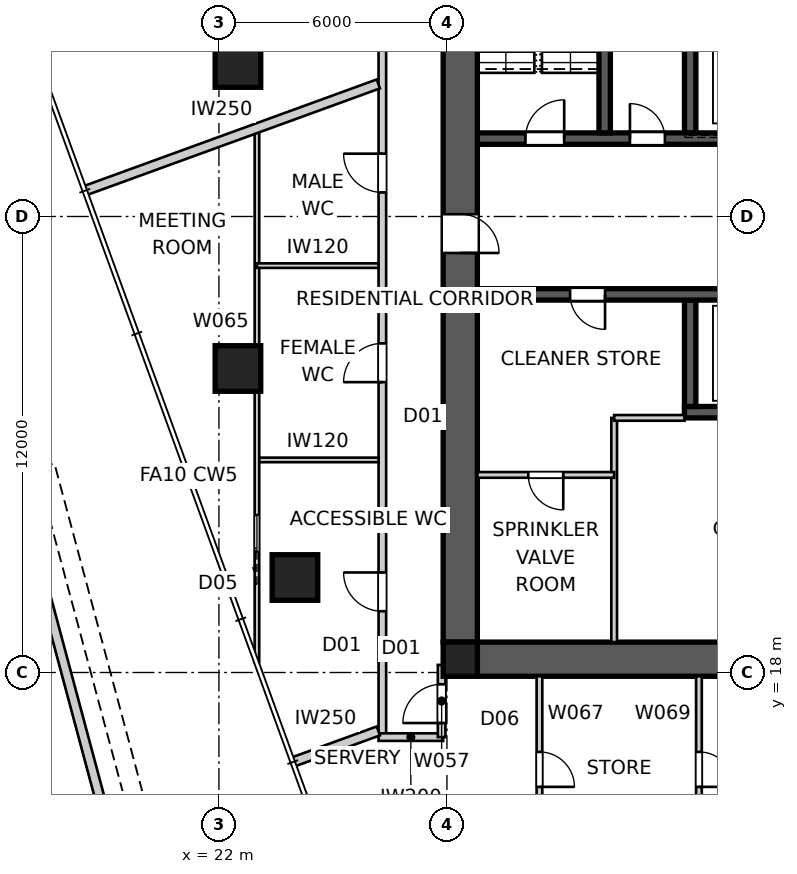
"""IFC4 building model, lengths in metres.
Left out: names, types, materials, properties, quantities, classifications, styles, units other than length and angle.
Written with IfcOpenShell. Run it as: python <this file> out.ifc"""

import sys

from ifc_helpers import new_model, si_unit, direction, frame, frame_2d, origin, origin_2d, place, context, subcontext, project, spatial, polyline, rectangle, outline, extrude, element, fill, save


model = new_model("IFC4")
c1 = context("Model", 3, precision=1e-05, world=origin(), true_north=direction((0.0, 1.0)))
c2 = subcontext(c1, "Body", "Model", "MODEL_VIEW")
j1 = project(units=[si_unit("LENGTHUNIT", "METRE"), si_unit("PLANEANGLEUNIT", "RADIAN")], contexts=[c1])
p1 = place(None, origin())
s1 = spatial("IfcSite", under=j1, at=p1, CompositionType="ELEMENT")
p2 = place(p1, origin())
s2 = spatial("IfcBuilding", under=s1, at=p2, CompositionType="ELEMENT")
p3 = place(p2, frame((0.0, 0.0, 138.8)))
s3 = spatial("IfcBuildingStorey", under=s2, at=p3, CompositionType="ELEMENT", Elevation=138.8)
p4 = place(p3, frame((51.2, 18.35, 0.0), z_axis=(0.0, 0.0, 1.0), x_axis=(-1.0, 0.0, 0.0)))
e1 = element("IfcWall", 1, at=p4, inside=s3, PredefinedType="SHEAR", context=c2, shape_type="SweptSolid", body=[
    extrude(outline(polyline([(0.0, -0.45), (22.4, -0.45), (22.4, -0.025), (22.85, -0.025), (22.85, 0.025), (22.4, 0.025), (22.4, 0.45), (0.0, 0.45), (0.0, 0.025), (-0.45, 0.025), (-0.45, -0.025), (0.0, -0.025), (0.0, -0.45)])), origin(), (0.0, 0.0, 1.0), 5.0),
])
p5 = place(p3, frame((28.35, 41.2, 0.0), z_axis=(0.0, 0.0, 1.0), x_axis=(0.0, -1.0, 0.0)))
e2 = element("IfcWall", 2, at=p5, inside=s3, PredefinedType="SHEAR", context=c2, shape_type="SweptSolid", body=[
    extrude(outline(polyline([(0.0, -0.45), (22.4, -0.45), (22.4, -0.025), (22.85, -0.025), (22.85, 0.025), (22.4, 0.025), (22.4, 0.45), (0.0, 0.45), (0.0, 0.025), (-0.45, 0.025), (-0.45, -0.025), (0.0, -0.025), (0.0, -0.45)])), origin(), (0.0, 0.0, 1.0), 5.0),
])
p6 = place(p5, frame((11.14, 0.0, 0.0)))
e3 = element("IfcOpeningElement", 3, at=p6, cuts=e2, PredefinedType="OPENING", context=c2, shape_type="SweptSolid", body=[
    extrude(rectangle(XDim=1.02, YDim=2.4, at=frame_2d((0.51, 1.2))), frame((0.0, 0.46, 0.0), z_axis=(0.0, -1.0, 0.0), x_axis=(1.0, 0.0, 0.0)), (0.0, 0.0, 1.0), 0.92),
])
p7 = place(p3, frame((28.8, 32.05, 0.0), z_axis=(0.0, 0.0, 1.0), x_axis=(1.0, 0.0, 0.0)))
e4 = element("IfcWall", 4, at=p7, inside=s3, PredefinedType="SHEAR", context=c2, shape_type="SweptSolid", body=[
    extrude(rectangle(XDim=22.4, YDim=0.3, at=frame_2d((11.2, 0.0))), origin(), (0.0, 0.0, 1.0), 5.0),
])
p8 = place(p7, frame((19.04, 0.0, 0.0)))
e5 = element("IfcOpeningElement", 5, at=p8, cuts=e4, PredefinedType="OPENING", context=c2, shape_type="SweptSolid", body=[
    extrude(rectangle(XDim=0.92, YDim=2.1, at=frame_2d((0.46, 1.05))), frame((0.0, 0.16, 0.0), z_axis=(0.0, -1.0, 0.0), x_axis=(1.0, 0.0, 0.0)), (0.0, 0.0, 1.0), 0.32),
])
p9 = place(p7, frame((1.265, 0.0, 0.0)))
e6 = element("IfcOpeningElement", 6, at=p9, cuts=e4, PredefinedType="OPENING", context=c2, shape_type="SweptSolid", body=[
    extrude(rectangle(XDim=1.02, YDim=2.1, at=frame_2d((0.51, 1.05))), frame((0.0, 0.16, 0.0), z_axis=(0.0, -1.0, 0.0), x_axis=(1.0, 0.0, 0.0)), (0.0, 0.0, 1.0), 0.32),
])
p10 = place(p7, frame((4.015, 0.0, 0.0)))
e7 = element("IfcOpeningElement", 7, at=p10, cuts=e4, PredefinedType="OPENING", context=c2, shape_type="SweptSolid", body=[
    extrude(rectangle(XDim=0.92, YDim=2.1, at=frame_2d((0.46, 1.05))), frame((0.0, 0.16, 0.0), z_axis=(0.0, -1.0, 0.0), x_axis=(1.0, 0.0, 0.0)), (0.0, 0.0, 1.0), 0.32),
])
p11 = place(p7, frame((6.45, 0.0, 0.0)))
e8 = element("IfcOpeningElement", 8, at=p11, cuts=e4, PredefinedType="OPENING", context=c2, shape_type="SweptSolid", body=[
    extrude(rectangle(XDim=1.1, YDim=2.1, at=frame_2d((0.55, 1.05))), frame((0.0, 0.16, 0.0), z_axis=(0.0, -1.0, 0.0), x_axis=(1.0, 0.0, 0.0)), (0.0, 0.0, 1.0), 0.32),
])
p12 = place(p7, frame((9.25, 0.0, 0.0)))
e9 = element("IfcOpeningElement", 9, at=p12, cuts=e4, PredefinedType="OPENING", context=c2, shape_type="SweptSolid", body=[
    extrude(rectangle(XDim=1.1, YDim=2.1, at=frame_2d((0.55, 1.05))), frame((0.0, 0.16, 0.0), z_axis=(0.0, -1.0, 0.0), x_axis=(1.0, 0.0, 0.0)), (0.0, 0.0, 1.0), 0.32),
])
p13 = place(p7, frame((12.05, 0.0, 0.0)))
e10 = element("IfcOpeningElement", 10, at=p13, cuts=e4, PredefinedType="OPENING", context=c2, shape_type="SweptSolid", body=[
    extrude(rectangle(XDim=1.1, YDim=2.1, at=frame_2d((0.55, 1.05))), frame((0.0, 0.16, 0.0), z_axis=(0.0, -1.0, 0.0), x_axis=(1.0, 0.0, 0.0)), (0.0, 0.0, 1.0), 0.32),
])
p14 = place(p7, frame((14.85, 0.0, 0.0)))
e11 = element("IfcOpeningElement", 11, at=p14, cuts=e4, PredefinedType="OPENING", context=c2, shape_type="SweptSolid", body=[
    extrude(rectangle(XDim=1.1, YDim=2.1, at=frame_2d((0.55, 1.05))), frame((0.0, 0.16, 0.0), z_axis=(0.0, -1.0, 0.0), x_axis=(1.0, 0.0, 0.0)), (0.0, 0.0, 1.0), 0.32),
])
p15 = place(p3, frame((51.2, 27.95, 0.0), z_axis=(0.0, 0.0, 1.0), x_axis=(-1.0, 0.0, 0.0)))
e12 = element("IfcWall", 12, at=p15, inside=s3, PredefinedType="SHEAR", context=c2, shape_type="SweptSolid", body=[
    extrude(rectangle(XDim=22.4, YDim=0.3, at=frame_2d((11.2, 0.0))), origin(), (0.0, 0.0, 1.0), 5.0),
])
p16 = place(p15, frame((19.04, 0.0, 0.0)))
e13 = element("IfcOpeningElement", 13, at=p16, cuts=e12, PredefinedType="OPENING", context=c2, shape_type="SweptSolid", body=[
    extrude(rectangle(XDim=0.92, YDim=2.1, at=frame_2d((0.46, 1.05))), frame((0.0, 0.16, 0.0), z_axis=(0.0, -1.0, 0.0), x_axis=(1.0, 0.0, 0.0)), (0.0, 0.0, 1.0), 0.32),
])
p17 = place(p15, frame((1.265, 0.0, 0.0)))
e14 = element("IfcOpeningElement", 14, at=p17, cuts=e12, PredefinedType="OPENING", context=c2, shape_type="SweptSolid", body=[
    extrude(rectangle(XDim=1.02, YDim=2.1, at=frame_2d((0.51, 1.05))), frame((0.0, 0.16, 0.0), z_axis=(0.0, -1.0, 0.0), x_axis=(1.0, 0.0, 0.0)), (0.0, 0.0, 1.0), 0.32),
])
p18 = place(p15, frame((4.015, 0.0, 0.0)))
e15 = element("IfcOpeningElement", 15, at=p18, cuts=e12, PredefinedType="OPENING", context=c2, shape_type="SweptSolid", body=[
    extrude(rectangle(XDim=0.92, YDim=2.1, at=frame_2d((0.46, 1.05))), frame((0.0, 0.16, 0.0), z_axis=(0.0, -1.0, 0.0), x_axis=(1.0, 0.0, 0.0)), (0.0, 0.0, 1.0), 0.32),
])
p19 = place(p15, frame((6.45, 0.0, 0.0)))
e16 = element("IfcOpeningElement", 16, at=p19, cuts=e12, PredefinedType="OPENING", context=c2, shape_type="SweptSolid", body=[
    extrude(rectangle(XDim=1.1, YDim=2.1, at=frame_2d((0.55, 1.05))), frame((0.0, 0.16, 0.0), z_axis=(0.0, -1.0, 0.0), x_axis=(1.0, 0.0, 0.0)), (0.0, 0.0, 1.0), 0.32),
])
p20 = place(p15, frame((9.25, 0.0, 0.0)))
e17 = element("IfcOpeningElement", 17, at=p20, cuts=e12, PredefinedType="OPENING", context=c2, shape_type="SweptSolid", body=[
    extrude(rectangle(XDim=1.1, YDim=2.1, at=frame_2d((0.55, 1.05))), frame((0.0, 0.16, 0.0), z_axis=(0.0, -1.0, 0.0), x_axis=(1.0, 0.0, 0.0)), (0.0, 0.0, 1.0), 0.32),
])
p21 = place(p15, frame((12.05, 0.0, 0.0)))
e18 = element("IfcOpeningElement", 18, at=p21, cuts=e12, PredefinedType="OPENING", context=c2, shape_type="SweptSolid", body=[
    extrude(rectangle(XDim=1.1, YDim=2.1, at=frame_2d((0.55, 1.05))), frame((0.0, 0.16, 0.0), z_axis=(0.0, -1.0, 0.0), x_axis=(1.0, 0.0, 0.0)), (0.0, 0.0, 1.0), 0.32),
])
p22 = place(p15, frame((14.85, 0.0, 0.0)))
e19 = element("IfcOpeningElement", 19, at=p22, cuts=e12, PredefinedType="OPENING", context=c2, shape_type="SweptSolid", body=[
    extrude(rectangle(XDim=1.1, YDim=2.1, at=frame_2d((0.55, 1.05))), frame((0.0, 0.16, 0.0), z_axis=(0.0, -1.0, 0.0), x_axis=(1.0, 0.0, 0.0)), (0.0, 0.0, 1.0), 0.32),
])
p23 = place(p3, frame((45.75, 24.85, 0.0), z_axis=(0.0, 0.0, 1.0), x_axis=(-1.0, 0.0, 0.0)))
e20 = element("IfcWall", 20, at=p23, inside=s3, PredefinedType="SHEAR", context=c2, shape_type="SweptSolid", body=[
    extrude(rectangle(XDim=11.5, YDim=0.3, at=frame_2d((5.75, 0.0))), origin(), (0.0, 0.0, 1.0), 5.0),
])
for number, where, z_axis, x_axis in (
    (21, (34.4, 32.2, 0.0), (0.0, 0.0, 1.0), (0.0, 1.0, 0.0)),
    (22, (34.4, 27.8, 0.0), (0.0, 0.0, 1.0), (0.0, -1.0, 0.0)),
):
    element("IfcWall", number, at=place(p3, frame(where, z_axis=z_axis, x_axis=x_axis)), inside=s3, PredefinedType="SHEAR", context=c2, shape_type="SweptSolid", body=[
        extrude(rectangle(XDim=2.8, YDim=0.3, at=frame_2d((1.4, 0.0))), origin(), (0.0, 0.0, 1.0), 5.0),
    ])
p24 = place(p3, frame((32.15, 32.2, 0.0), z_axis=(0.0, 0.0, 1.0), x_axis=(0.0, 1.0, 0.0)))
e23 = element("IfcWall", 23, at=p24, inside=s3, PredefinedType="SHEAR", context=c2, shape_type="SweptSolid", body=[
    extrude(rectangle(XDim=7.7, YDim=0.3, at=frame_2d((3.85, 0.0))), origin(), (0.0, 0.0, 1.0), 5.0),
])
p25 = place(p3, frame((28.35, 18.35, 0.0), z_axis=(0.0, 0.0, 1.0), x_axis=(1.0, 0.0, 0.0)))
e24 = element("IfcColumn", 24, at=p25, inside=s3, PredefinedType="COLUMN", context=c2, shape_type="SweptSolid", body=[
    extrude(rectangle(XDim=0.9, YDim=0.9, at=origin_2d()), origin(), (0.0, 0.0, 1.0), 5.0),
])
for number, where, z_axis, x_axis in (
    (25, (22.5, 34.0, 0.0), (0.0, 0.0, 1.0), (1.0, 0.0, 0.0)),
    (26, (22.5, 26.0, 0.0), (0.0, 0.0, 1.0), (1.0, 0.0, 0.0)),
    (27, (24.0, 20.5, 0.0), (0.0, 0.0, 1.0), (1.0, 0.0, 0.0)),
):
    element("IfcColumn", number, at=place(p3, frame(where, z_axis=z_axis, x_axis=x_axis)), inside=s3, PredefinedType="COLUMN", context=c2, shape_type="SweptSolid", body=[
        extrude(rectangle(XDim=1.2, YDim=1.2, at=origin_2d()), origin(), (0.0, 0.0, 1.0), 5.0),
    ])
p26 = place(p3, frame((15.248, 28.199, -0.05), z_axis=(0.0, 0.0, 1.0), x_axis=(0.258820599944, -0.965925409669, 0.0)))
e28 = element("IfcWall", 28, at=p26, inside=s3, PredefinedType="PARAPET", context=c2, shape_type="SweptSolid", body=[
    extrude(rectangle(XDim=29.167, YDim=0.25, at=frame_2d((14.583, 0.0))), origin(), (0.0, 0.0, 1.0), 1.15),
])
p27 = place(p3, frame((26.3, 16.3, 0.0), z_axis=(0.0, 0.0, 1.0), x_axis=(0.0, 1.0, 0.0)))
e29 = element("IfcWall", 29, at=p27, inside=s3, PredefinedType="PARTITIONING", context=c2, shape_type="SweptSolid", body=[
    extrude(rectangle(XDim=27.4, YDim=0.2, at=frame_2d((13.7, 0.0))), origin(), (0.0, 0.0, 1.0), 4.85),
])
p28 = place(p27, frame((21.639, 0.0, 0.0)))
e30 = element("IfcOpeningElement", 30, at=p28, cuts=e29, PredefinedType="OPENING", context=c2, shape_type="SweptSolid", body=[
    extrude(rectangle(XDim=1.02, YDim=2.34, at=frame_2d((0.51, 1.17))), frame((0.0, 0.11, 0.0), z_axis=(0.0, -1.0, 0.0), x_axis=(1.0, 0.0, 0.0)), (0.0, 0.0, 1.0), 0.22),
])
p29 = place(p27, frame((3.312, 0.0, 0.0)))
e31 = element("IfcOpeningElement", 31, at=p29, cuts=e29, PredefinedType="OPENING", context=c2, shape_type="SweptSolid", body=[
    extrude(rectangle(XDim=1.02, YDim=2.34, at=frame_2d((0.51, 1.17))), frame((0.0, 0.11, 0.0), z_axis=(0.0, -1.0, 0.0), x_axis=(1.0, 0.0, 0.0)), (0.0, 0.0, 1.0), 0.22),
])
p30 = place(p27, frame((9.341, 0.0, 0.0)))
e32 = element("IfcOpeningElement", 32, at=p30, cuts=e29, PredefinedType="OPENING", context=c2, shape_type="SweptSolid", body=[
    extrude(rectangle(XDim=1.02, YDim=2.34, at=frame_2d((0.51, 1.17))), frame((0.0, 0.11, 0.0), z_axis=(0.0, -1.0, 0.0), x_axis=(1.0, 0.0, 0.0)), (0.0, 0.0, 1.0), 0.22),
])
p31 = place(p27, frame((14.333, 0.0, 0.0)))
e33 = element("IfcOpeningElement", 33, at=p31, cuts=e29, PredefinedType="OPENING", context=c2, shape_type="SweptSolid", body=[
    extrude(rectangle(XDim=1.02, YDim=2.34, at=frame_2d((0.51, 1.17))), frame((0.0, 0.11, 0.0), z_axis=(0.0, -1.0, 0.0), x_axis=(1.0, 0.0, 0.0)), (0.0, 0.0, 1.0), 0.22),
])
p32 = place(p3, frame((27.9, 16.3, 0.0), z_axis=(0.0, 0.0, 1.0), x_axis=(-1.0, 0.0, 0.0)))
e34 = element("IfcWall", 34, at=p32, inside=s3, PredefinedType="PARTITIONING", context=c2, shape_type="SweptSolid", body=[
    extrude(rectangle(XDim=1.7, YDim=0.2, at=frame_2d((0.85, 0.0))), origin(), (0.0, 0.0, 1.0), 4.85),
])
p33 = place(p3, frame((27.86, 16.3, 0.0), z_axis=(0.0, 0.0, 1.0), x_axis=(0.0, 1.0, 0.0)))
e35 = element("IfcWall", 35, at=p33, inside=s3, PredefinedType="PARTITIONING", context=c2, shape_type="SweptSolid", body=[
    extrude(rectangle(XDim=1.9, YDim=0.2, at=frame_2d((0.95, 0.0))), origin(), (0.0, 0.0, 1.0), 4.85),
])
p34 = place(p33, frame((0.37, 0.0, 0.0)))
e36 = element("IfcOpeningElement", 36, at=p34, cuts=e35, PredefinedType="OPENING", context=c2, shape_type="SweptSolid", body=[
    extrude(rectangle(XDim=1.02, YDim=2.34, at=frame_2d((0.51, 1.17))), frame((0.0, 0.11, 0.0), z_axis=(0.0, -1.0, 0.0), x_axis=(1.0, 0.0, 0.0)), (0.0, 0.0, 1.0), 0.22),
])
p35 = place(p3, frame((18.47, 30.677, 0.0), z_axis=(0.0, 0.0, 1.0), x_axis=(0.939696268654, 0.342010120724, 0.0)))
e37 = element("IfcWall", 37, at=p35, inside=s3, PredefinedType="PARTITIONING", context=c2, shape_type="SweptSolid", body=[
    extrude(rectangle(XDim=8.221, YDim=0.25, at=frame_2d((4.11, 0.0))), origin(), (0.0, 0.0, 1.0), 4.85),
])
p36 = place(p3, frame((23.942, 15.642, 0.0), z_axis=(0.0, 0.0, 1.0), x_axis=(0.939692273186, 0.342021098348, 0.0)))
e38 = element("IfcWall", 38, at=p36, inside=s3, PredefinedType="PARTITIONING", context=c2, shape_type="SweptSolid", body=[
    extrude(rectangle(XDim=2.397, YDim=0.25, at=frame_2d((1.198, 0.0))), origin(), (0.0, 0.0, 1.0), 4.85),
])
p37 = place(p3, frame((32.4, 18.8, 0.0), z_axis=(0.0, 0.0, 1.0), x_axis=(0.0, 1.0, 0.0)))
e39 = element("IfcWall", 39, at=p37, inside=s3, PredefinedType="SOLIDWALL", context=c2, shape_type="SweptSolid", body=[
    extrude(rectangle(XDim=5.9, YDim=0.15, at=frame_2d((2.95, 0.0))), origin(), (0.0, 0.0, 1.0), 4.85),
])
p38 = place(p3, frame((32.4, 24.7, 0.0), z_axis=(0.0, 0.0, 1.0), x_axis=(1.0, 0.0, 0.0)))
e40 = element("IfcWall", 40, at=p38, inside=s3, PredefinedType="SOLIDWALL", context=c2, shape_type="SweptSolid", body=[
    extrude(rectangle(XDim=1.85, YDim=0.15, at=frame_2d((0.925, 0.0))), origin(), (0.0, 0.0, 1.0), 4.85),
])
p39 = place(p3, frame((32.4, 23.2, 0.0), z_axis=(0.0, 0.0, 1.0), x_axis=(-1.0, 0.0, 0.0)))
e41 = element("IfcWall", 41, at=p39, inside=s3, PredefinedType="SOLIDWALL", context=c2, shape_type="SweptSolid", body=[
    extrude(rectangle(XDim=3.6, YDim=0.15, at=frame_2d((1.8, 0.0))), origin(), (0.0, 0.0, 1.0), 4.85),
])
p40 = place(p39, frame((1.34, 0.0, 0.0)))
e42 = element("IfcOpeningElement", 42, at=p40, cuts=e41, PredefinedType="OPENING", context=c2, shape_type="SweptSolid", body=[
    extrude(rectangle(XDim=0.92, YDim=2.1, at=frame_2d((0.46, 1.05))), frame((0.0, 0.085, 0.0), z_axis=(0.0, -1.0, 0.0), x_axis=(1.0, 0.0, 0.0)), (0.0, 0.0, 1.0), 0.17),
])
p41 = place(p3, frame((23.0, 23.594, 0.0), z_axis=(0.0, 0.0, 1.0), x_axis=(1.0, 0.0, 0.0)))
e43 = element("IfcWall", 43, at=p41, inside=s3, PredefinedType="PARTITIONING", context=c2, shape_type="SweptSolid", body=[
    extrude(rectangle(XDim=3.2, YDim=0.12, at=frame_2d((1.6, 0.0))), origin(), (0.0, 0.0, 1.0), 4.85),
])
p42 = place(p3, frame((23.0, 18.271, 0.0), z_axis=(0.0, 0.0, 1.0), x_axis=(0.0, 1.0, 0.0)))
e44 = element("IfcWall", 44, at=p42, inside=s3, PredefinedType="PARTITIONING", context=c2, shape_type="SweptSolid", body=[
    extrude(rectangle(XDim=14.055, YDim=0.12, at=frame_2d((7.027, 0.0))), origin(), (0.0, 0.0, 1.0), 3.85),
])
p43 = place(p42, frame((2.912, 0.0, 0.0)))
e45 = element("IfcOpeningElement", 45, at=p43, cuts=e44, PredefinedType="OPENING", context=c2, shape_type="SweptSolid", body=[
    extrude(rectangle(XDim=0.96, YDim=2.1, at=frame_2d((0.48, 1.05))), frame((0.0, 0.07, 0.0), z_axis=(0.0, -1.0, 0.0), x_axis=(1.0, 0.0, 0.0)), (0.0, 0.0, 1.0), 0.14),
])
p44 = place(p3, frame((23.0, 28.707, 0.0), z_axis=(0.0, 0.0, 1.0), x_axis=(1.0, 0.0, 0.0)))
e46 = element("IfcWall", 46, at=p44, inside=s3, PredefinedType="PARTITIONING", context=c2, shape_type="SweptSolid", body=[
    extrude(rectangle(XDim=3.2, YDim=0.12, at=frame_2d((1.6, 0.0))), origin(), (0.0, 0.0, 1.0), 4.85),
])
p45 = place(p3, frame((30.434, 17.9, 0.0), z_axis=(0.0, 0.0, 1.0), x_axis=(0.0, -1.0, 0.0)))
e47 = element("IfcWall", 47, at=p45, inside=s3, PredefinedType="SOLIDWALL", context=c2, shape_type="SweptSolid", body=[
    extrude(rectangle(XDim=4.9, YDim=0.15, at=frame_2d((2.45, 0.0))), origin(), (0.0, 0.0, 1.0), 4.85),
])
p46 = place(p45, frame((1.99, 0.0, 0.0)))
e48 = element("IfcOpeningElement", 48, at=p46, cuts=e47, PredefinedType="OPENING", context=c2, shape_type="SweptSolid", body=[
    extrude(rectangle(XDim=0.92, YDim=2.1, at=frame_2d((0.46, 1.05))), frame((0.0, 0.085, 0.0), z_axis=(0.0, -1.0, 0.0), x_axis=(1.0, 0.0, 0.0)), (0.0, 0.0, 1.0), 0.17),
])
p47 = place(p3, frame((34.631, 17.9, 0.0), z_axis=(0.0, 0.0, 1.0), x_axis=(0.0, -1.0, 0.0)))
e49 = element("IfcWall", 49, at=p47, inside=s3, PredefinedType="SOLIDWALL", context=c2, shape_type="SweptSolid", body=[
    extrude(rectangle(XDim=4.9, YDim=0.15, at=frame_2d((2.45, 0.0))), origin(), (0.0, 0.0, 1.0), 4.85),
])
p48 = place(p47, frame((1.99, 0.0, 0.0)))
e50 = element("IfcOpeningElement", 50, at=p48, cuts=e49, PredefinedType="OPENING", context=c2, shape_type="SweptSolid", body=[
    extrude(rectangle(XDim=0.92, YDim=2.1, at=frame_2d((0.46, 1.05))), frame((0.0, 0.085, 0.0), z_axis=(0.0, -1.0, 0.0), x_axis=(1.0, 0.0, 0.0)), (0.0, 0.0, 1.0), 0.17),
])
p49 = place(p16, origin())
e51 = element("IfcDoor", 51, at=p49, inside=s3, OperationType="SINGLE_SWING_LEFT", PredefinedType="DOOR", context=c2, shape_type="SweptSolid", body=[
    extrude(rectangle(XDim=0.92, YDim=2.1, at=frame_2d((0.46, 1.05))), frame((0.0, 0.025, 0.0), z_axis=(0.0, -1.0, 0.0), x_axis=(1.0, 0.0, 0.0)), (0.0, 0.0, 1.0), 0.05),
])
fill(e13, e51)
p50 = place(p9, origin())
e52 = element("IfcDoor", 52, at=p50, inside=s3, OperationType="SINGLE_SWING_RIGHT", PredefinedType="DOOR", context=c2, shape_type="SweptSolid", body=[
    extrude(rectangle(XDim=1.02, YDim=2.1, at=frame_2d((0.51, 1.05))), frame((0.0, 0.025, 0.0), z_axis=(0.0, -1.0, 0.0), x_axis=(1.0, 0.0, 0.0)), (0.0, 0.0, 1.0), 0.05),
])
fill(e6, e52)
p51 = place(p10, origin())
e53 = element("IfcDoor", 53, at=p51, inside=s3, OperationType="SINGLE_SWING_LEFT", PredefinedType="DOOR", context=c2, shape_type="SweptSolid", body=[
    extrude(rectangle(XDim=0.92, YDim=2.1, at=frame_2d((0.46, 1.05))), frame((0.0, 0.025, 0.0), z_axis=(0.0, -1.0, 0.0), x_axis=(1.0, 0.0, 0.0)), (0.0, 0.0, 1.0), 0.05),
])
fill(e7, e53)
p52 = place(p29, origin())
e54 = element("IfcDoor", 54, at=p52, inside=s3, OperationType="SINGLE_SWING_RIGHT", PredefinedType="DOOR", context=c2, shape_type="SweptSolid", body=[
    extrude(rectangle(XDim=1.02, YDim=2.34, at=frame_2d((0.51, 1.17))), frame((0.0, 0.025, 0.0), z_axis=(0.0, -1.0, 0.0), x_axis=(1.0, 0.0, 0.0)), (0.0, 0.0, 1.0), 0.05),
])
fill(e31, e54)
p53 = place(p30, origin())
e55 = element("IfcDoor", 55, at=p53, inside=s3, OperationType="SINGLE_SWING_LEFT", PredefinedType="DOOR", context=c2, shape_type="SweptSolid", body=[
    extrude(rectangle(XDim=1.02, YDim=2.34, at=frame_2d((0.51, 1.17))), frame((0.0, 0.025, 0.0), z_axis=(0.0, -1.0, 0.0), x_axis=(1.0, 0.0, 0.0)), (0.0, 0.0, 1.0), 0.05),
])
fill(e32, e55)
p54 = place(p31, origin())
e56 = element("IfcDoor", 56, at=p54, inside=s3, OperationType="SINGLE_SWING_RIGHT", PredefinedType="DOOR", context=c2, shape_type="SweptSolid", body=[
    extrude(rectangle(XDim=1.02, YDim=2.34, at=frame_2d((0.51, 1.17))), frame((0.0, 0.025, 0.0), z_axis=(0.0, -1.0, 0.0), x_axis=(1.0, 0.0, 0.0)), (0.0, 0.0, 1.0), 0.05),
])
fill(e33, e56)
p55 = place(p34, origin())
e57 = element("IfcDoor", 57, at=p55, inside=s3, OperationType="SINGLE_SWING_LEFT", PredefinedType="DOOR", context=c2, shape_type="SweptSolid", body=[
    extrude(rectangle(XDim=1.02, YDim=2.34, at=frame_2d((0.51, 1.17))), frame((0.0, 0.025, 0.0), z_axis=(0.0, -1.0, 0.0), x_axis=(1.0, 0.0, 0.0)), (0.0, 0.0, 1.0), 0.05),
])
fill(e36, e57)
p56 = place(p40, origin())
e58 = element("IfcDoor", 58, at=p56, inside=s3, OperationType="SINGLE_SWING_LEFT", PredefinedType="DOOR", context=c2, shape_type="SweptSolid", body=[
    extrude(rectangle(XDim=0.92, YDim=2.1, at=frame_2d((0.46, 1.05))), frame((0.0, 0.025, 0.0), z_axis=(0.0, -1.0, 0.0), x_axis=(1.0, 0.0, 0.0)), (0.0, 0.0, 1.0), 0.05),
])
fill(e42, e58)
p57 = place(p43, origin())
e59 = element("IfcDoor", 59, at=p57, inside=s3, OperationType="SLIDING_TO_LEFT", PredefinedType="DOOR", context=c2, shape_type="SweptSolid", body=[
    extrude(rectangle(XDim=0.96, YDim=2.1, at=frame_2d((0.48, 1.05))), frame((0.0, 0.025, 0.0), z_axis=(0.0, -1.0, 0.0), x_axis=(1.0, 0.0, 0.0)), (0.0, 0.0, 1.0), 0.05),
])
fill(e45, e59)
p58 = place(p46, origin())
e60 = element("IfcDoor", 60, at=p58, inside=s3, OperationType="SINGLE_SWING_RIGHT", PredefinedType="DOOR", context=c2, shape_type="SweptSolid", body=[
    extrude(rectangle(XDim=0.92, YDim=2.1, at=frame_2d((0.46, 1.05))), frame((0.0, 0.025, 0.0), z_axis=(0.0, -1.0, 0.0), x_axis=(1.0, 0.0, 0.0)), (0.0, 0.0, 1.0), 0.05),
])
fill(e48, e60)
p59 = place(p48, origin())
e61 = element("IfcDoor", 61, at=p59, inside=s3, OperationType="SINGLE_SWING_RIGHT", PredefinedType="DOOR", context=c2, shape_type="SweptSolid", body=[
    extrude(rectangle(XDim=0.92, YDim=2.1, at=frame_2d((0.46, 1.05))), frame((0.0, 0.025, 0.0), z_axis=(0.0, -1.0, 0.0), x_axis=(1.0, 0.0, 0.0)), (0.0, 0.0, 1.0), 0.05),
])
fill(e50, e61)
p60 = place(p6, origin())
e62 = element("IfcDoor", 62, at=p60, inside=s3, OperationType="SINGLE_SWING_RIGHT", PredefinedType="DOOR", context=c2, shape_type="SweptSolid", body=[
    extrude(rectangle(XDim=1.02, YDim=2.4, at=frame_2d((0.51, 1.2))), frame((0.0, 0.025, 0.0), z_axis=(0.0, -1.0, 0.0), x_axis=(1.0, 0.0, 0.0)), (0.0, 0.0, 1.0), 0.05),
])
fill(e3, e62)
save(model, sys.argv[1])
